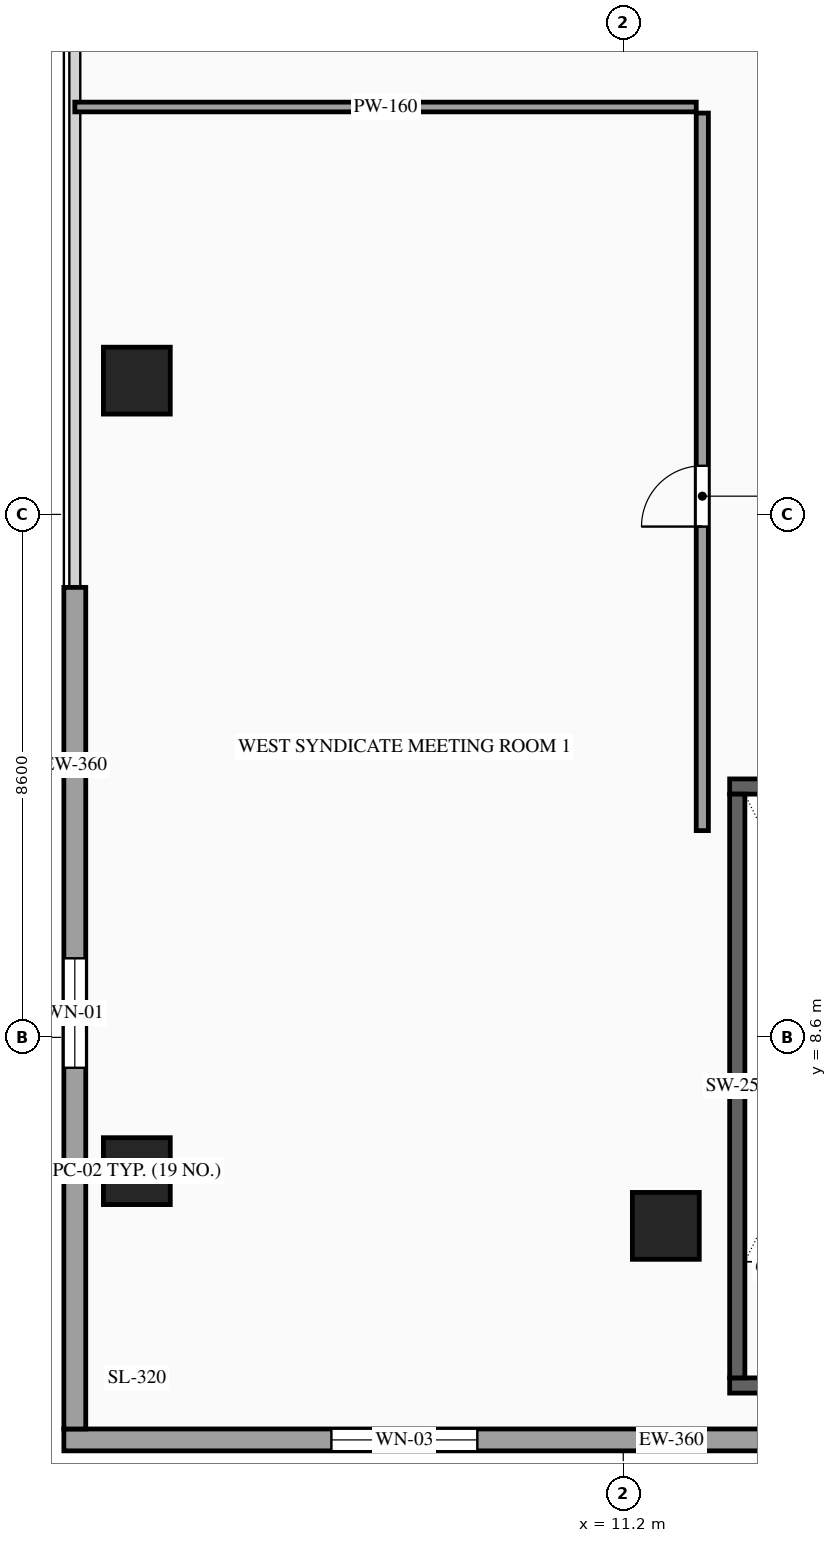
"""IFC4 building model, lengths in metres.
Left out: names, types, materials, properties, quantities, classifications, styles, units other than length and angle.
Written with IfcOpenShell. Run it as: python <this file> out.ifc"""

import sys

from ifc_helpers import new_model, si_unit, direction, frame, frame_2d, origin, origin_2d, place, context, subcontext, project, spatial, rectangle, extrude, source, transform, mapped, element, fill, save


model = new_model("IFC4")
c1 = context("Model", 3, precision=1e-05, world=origin(), true_north=direction((0.0, 1.0)))
c2 = subcontext(c1, "Body", "Model", "MODEL_VIEW")
j1 = project(units=[si_unit("LENGTHUNIT", "METRE"), si_unit("PLANEANGLEUNIT", "RADIAN")], contexts=[c1])
p1 = place(None, origin())
s1 = spatial("IfcSite", under=j1, at=p1, CompositionType="ELEMENT")
p2 = place(p1, origin())
s2 = spatial("IfcBuilding", under=s1, at=p2, CompositionType="ELEMENT")
p3 = place(p2, frame((0.0, 0.0, 25.8)))
s3 = spatial("IfcBuildingStorey", under=s2, at=p3, CompositionType="ELEMENT", Elevation=25.8)
m1 = source(origin(), c2, "Body", "SweptSolid", [
    extrude(rectangle(XDim=1.1, YDim=1.1, at=origin_2d()), origin(), (0.0, 0.0, 1.0), 4.8),
])
for number, where, z_axis, x_axis in (
    (1, (3.2, 6.4, 0.0), (0.0, 0.0, 1.0), (1.0, 0.0, 0.0)),
    (2, (3.2, 19.4, 0.0), (0.0, 0.0, 1.0), (1.0, 0.0, 0.0)),
    (3, (11.9, 5.5, 0.0), (0.0, 0.0, 1.0), (1.0, 0.0, 0.0)),
):
    element("IfcColumn", number, at=place(p3, frame(where, z_axis=z_axis, x_axis=x_axis)), inside=s3, PredefinedType="COLUMN", context=c2, shape_type="MappedRepresentation", body=[
        mapped(m1, transform((0.0, 0.0, 0.0), scale=1.0)),
    ])
p4 = place(p3, frame((2.0, 1.98, 0.0), z_axis=(0.0, 0.0, 1.0), x_axis=(1.0, 0.0, 0.0)))
e4 = element("IfcWall", 4, at=p4, inside=s3, PredefinedType="SOLIDWALL", context=c2, shape_type="SweptSolid", body=[
    extrude(rectangle(XDim=12.93, YDim=0.36, at=frame_2d((6.465, 0.0))), origin(), (0.0, 0.0, 1.0), 4.5),
])
p5 = place(p4, frame((4.4, 0.0, 0.85)))
e5 = element("IfcOpeningElement", 5, at=p5, cuts=e4, PredefinedType="OPENING", context=c2, shape_type="SweptSolid", body=[
    extrude(rectangle(XDim=2.4, YDim=2.4, at=frame_2d((1.2, 1.2))), frame((0.0, 0.195, 0.0), z_axis=(0.0, -1.0, 0.0), x_axis=(1.0, 0.0, 0.0)), (0.0, 0.0, 1.0), 0.39),
])
p6 = place(p3, frame((2.18, 2.16, 0.0), z_axis=(0.0, 0.0, 1.0), x_axis=(0.0, 1.0, 0.0)))
e6 = element("IfcWall", 6, at=p6, inside=s3, PredefinedType="SOLIDWALL", context=c2, shape_type="SweptSolid", body=[
    extrude(rectangle(XDim=13.84, YDim=0.36, at=frame_2d((6.92, 0.0))), origin(), (0.0, 0.0, 1.0), 4.5),
])
p7 = place(p6, frame((5.94, 0.0, 0.9)))
e7 = element("IfcOpeningElement", 7, at=p7, cuts=e6, PredefinedType="OPENING", context=c2, shape_type="SweptSolid", body=[
    extrude(rectangle(XDim=1.8, YDim=2.2, at=frame_2d((0.9, 1.1))), frame((0.0, 0.195, 0.0), z_axis=(0.0, -1.0, 0.0), x_axis=(1.0, 0.0, 0.0)), (0.0, 0.0, 1.0), 0.39),
])
m2 = source(origin(), c2, "Body", "SweptSolid", [
    extrude(rectangle(XDim=4.3, YDim=0.25, at=frame_2d((2.15, 0.0))), origin(), (0.0, 0.0, 1.0), 4.5),
])
for number, where, z_axis, x_axis in (
    (8, (12.95, 2.875, 0.0), (0.0, 0.0, 1.0), (1.0, 0.0, 0.0)),
    (9, (12.95, 12.725, 0.0), (0.0, 0.0, 1.0), (1.0, 0.0, 0.0)),
):
    element("IfcWall", number, at=place(p3, frame(where, z_axis=z_axis, x_axis=x_axis)), inside=s3, PredefinedType="SOLIDWALL", context=c2, shape_type="MappedRepresentation", body=[
        mapped(m2, transform((0.0, 0.0, 0.0), scale=1.0)),
    ])
m3 = source(origin(), c2, "Body", "SweptSolid", [
    extrude(rectangle(XDim=9.6, YDim=0.25, at=frame_2d((4.8, 0.0))), origin(), (0.0, 0.0, 1.0), 4.5),
])
p8 = place(p3, frame((13.075, 3.0, 0.0), z_axis=(0.0, 0.0, 1.0), x_axis=(0.0, 1.0, 0.0)))
e10 = element("IfcWall", 10, at=p8, inside=s3, PredefinedType="SOLIDWALL", context=c2, shape_type="MappedRepresentation", body=[
    mapped(m3, transform((0.0, 0.0, 0.0), scale=1.0)),
])
p9 = place(p3, frame((12.5, 12.0, 0.0), z_axis=(0.0, 0.0, 1.0), x_axis=(0.0, 1.0, 0.0)))
e11 = element("IfcWall", 11, at=p9, inside=s3, PredefinedType="PARTITIONING", context=c2, shape_type="SweptSolid", body=[
    extrude(rectangle(XDim=11.8, YDim=0.2, at=frame_2d((5.9, 0.0))), origin(), (0.0, 0.0, 1.0), 4.5),
])
p10 = place(p9, frame((5.0, 0.0, 0.0)))
e12 = element("IfcOpeningElement", 12, at=p10, cuts=e11, PredefinedType="OPENING", context=c2, shape_type="SweptSolid", body=[
    extrude(rectangle(XDim=1.0, YDim=2.2, at=frame_2d((0.5, 1.1))), frame((0.0, 0.115, 0.0), z_axis=(0.0, -1.0, 0.0), x_axis=(1.0, 0.0, 0.0)), (0.0, 0.0, 1.0), 0.23),
])
m4 = source(origin(), c2, "Body", "SweptSolid", [
    extrude(rectangle(XDim=10.22, YDim=0.16, at=frame_2d((5.11, 0.0))), origin(), (0.0, 0.0, 1.0), 4.5),
])
p11 = place(p3, frame((2.18, 23.9, 0.0), z_axis=(0.0, 0.0, 1.0), x_axis=(1.0, 0.0, 0.0)))
e13 = element("IfcWall", 13, at=p11, inside=s3, PredefinedType="PARTITIONING", context=c2, shape_type="MappedRepresentation", body=[
    mapped(m4, transform((0.0, 0.0, 0.0), scale=1.0)),
])
m5 = source(origin(), c2, "Body", "SweptSolid", [
    extrude(rectangle(XDim=2.4, YDim=2.4, at=frame_2d((1.2, 1.2))), frame((0.0, 0.03, 0.0), z_axis=(0.0, -1.0, 0.0), x_axis=(1.0, 0.0, 0.0)), (0.0, 0.0, 1.0), 0.06),
])
p12 = place(p5, origin())
e14 = element("IfcWindow", 14, at=p12, inside=s3, PartitioningType="SINGLE_PANEL", PredefinedType="WINDOW", context=c2, shape_type="MappedRepresentation", body=[
    mapped(m5, transform((0.0, 0.0, 0.0), scale=1.0)),
])
fill(e5, e14)
m6 = source(origin(), c2, "Body", "SweptSolid", [
    extrude(rectangle(XDim=1.8, YDim=2.2, at=frame_2d((0.9, 1.1))), frame((0.0, 0.03, 0.0), z_axis=(0.0, -1.0, 0.0), x_axis=(1.0, 0.0, 0.0)), (0.0, 0.0, 1.0), 0.06),
])
p13 = place(p7, origin())
e15 = element("IfcWindow", 15, at=p13, inside=s3, PartitioningType="SINGLE_PANEL", PredefinedType="WINDOW", context=c2, shape_type="MappedRepresentation", body=[
    mapped(m6, transform((0.0, 0.0, 0.0), scale=1.0)),
])
fill(e7, e15)
m7 = source(origin(), c2, "Body", "SweptSolid", [
    extrude(rectangle(XDim=1.0, YDim=2.2, at=frame_2d((0.5, 1.1))), frame((0.0, 0.025, 0.0), z_axis=(0.0, -1.0, 0.0), x_axis=(1.0, 0.0, 0.0)), (0.0, 0.0, 1.0), 0.05),
])
p14 = place(p10, origin())
e16 = element("IfcDoor", 16, at=p14, inside=s3, OperationType="SINGLE_SWING_LEFT", PredefinedType="DOOR", context=c2, shape_type="MappedRepresentation", body=[
    mapped(m7, transform((0.0, 0.0, 0.0), scale=1.0)),
])
fill(e12, e16)
save(model, sys.argv[1])
